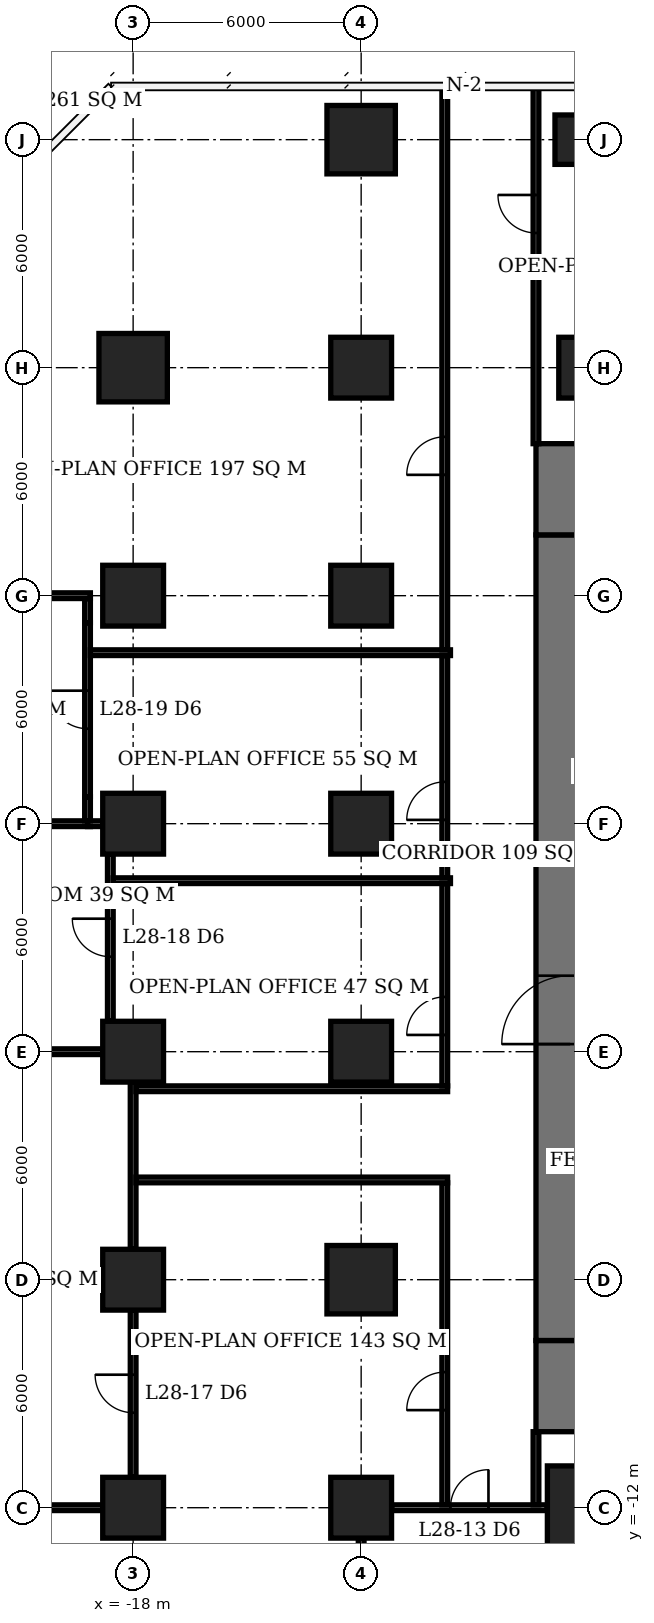
"""IFC4 building model, lengths in metres.
Left out: names, types, materials, properties, quantities, classifications, styles, units other than length and angle.
Written with IfcOpenShell. Run it as: python <this file> out.ifc"""

import sys

from ifc_helpers import new_model, si_unit, direction, frame, frame_2d, origin, origin_2d, place, context, subcontext, project, spatial, rectangle, extrude, element, fill, save


model = new_model("IFC4")
c1 = context("Model", 3, precision=1e-05, world=origin(), true_north=direction((0.0, 1.0)))
c2 = subcontext(c1, "Body", "Model", "MODEL_VIEW")
j1 = project(units=[si_unit("LENGTHUNIT", "METRE"), si_unit("PLANEANGLEUNIT", "RADIAN")], contexts=[c1])
p1 = place(None, origin())
s1 = spatial("IfcSite", under=j1, at=p1, CompositionType="ELEMENT")
p2 = place(p1, origin())
s2 = spatial("IfcBuilding", under=s1, at=p2, CompositionType="ELEMENT")
p3 = place(p2, frame((0.0, 0.0, 117.2)))
s3 = spatial("IfcBuildingStorey", under=s2, at=p3, CompositionType="ELEMENT", Elevation=117.2)
for number, where, z_axis, x_axis in (
    (1, (-18.0, -12.0, 0.0), (0.0, 0.0, 1.0), (1.0, 0.0, 0.0)),
    (2, (-18.0, -6.0, 0.0), (0.0, 0.0, 1.0), (1.0, 0.0, 0.0)),
    (3, (-18.0, 0.0, 0.0), (0.0, 0.0, 1.0), (1.0, 0.0, 0.0)),
    (4, (-18.0, 6.0, 0.0), (0.0, 0.0, 1.0), (1.0, 0.0, 0.0)),
    (5, (-18.0, 12.0, 0.0), (0.0, 0.0, 1.0), (1.0, 0.0, 0.0)),
):
    element("IfcColumn", number, at=place(p3, frame(where, z_axis=z_axis, x_axis=x_axis)), inside=s3, PredefinedType="COLUMN", context=c2, shape_type="SweptSolid", body=[
        extrude(rectangle(XDim=1.6, YDim=1.6, at=origin_2d()), origin(), (0.0, 0.0, 1.0), 3.9),
    ])
p4 = place(p3, frame((-18.0, 18.0, 0.0), z_axis=(0.0, 0.0, 1.0), x_axis=(1.0, 0.0, 0.0)))
e6 = element("IfcColumn", 6, at=p4, inside=s3, PredefinedType="COLUMN", context=c2, shape_type="SweptSolid", body=[
    extrude(rectangle(XDim=1.8, YDim=1.8, at=origin_2d()), origin(), (0.0, 0.0, 1.0), 3.9),
])
p5 = place(p3, frame((-12.0, -12.0, 0.0), z_axis=(0.0, 0.0, 1.0), x_axis=(1.0, 0.0, 0.0)))
e7 = element("IfcColumn", 7, at=p5, inside=s3, PredefinedType="COLUMN", context=c2, shape_type="SweptSolid", body=[
    extrude(rectangle(XDim=1.6, YDim=1.6, at=origin_2d()), origin(), (0.0, 0.0, 1.0), 3.9),
])
p6 = place(p3, frame((-12.0, -6.0, 0.0), z_axis=(0.0, 0.0, 1.0), x_axis=(1.0, 0.0, 0.0)))
e8 = element("IfcColumn", 8, at=p6, inside=s3, PredefinedType="COLUMN", context=c2, shape_type="SweptSolid", body=[
    extrude(rectangle(XDim=1.8, YDim=1.8, at=origin_2d()), origin(), (0.0, 0.0, 1.0), 3.9),
])
for number, where, z_axis, x_axis in (
    (9, (-12.0, 0.0, 0.0), (0.0, 0.0, 1.0), (1.0, 0.0, 0.0)),
    (10, (-12.0, 6.0, 0.0), (0.0, 0.0, 1.0), (1.0, 0.0, 0.0)),
    (11, (-12.0, 12.0, 0.0), (0.0, 0.0, 1.0), (1.0, 0.0, 0.0)),
    (12, (-12.0, 18.0, 0.0), (0.0, 0.0, 1.0), (1.0, 0.0, 0.0)),
):
    element("IfcColumn", number, at=place(p3, frame(where, z_axis=z_axis, x_axis=x_axis)), inside=s3, PredefinedType="COLUMN", context=c2, shape_type="SweptSolid", body=[
        extrude(rectangle(XDim=1.6, YDim=1.6, at=origin_2d()), origin(), (0.0, 0.0, 1.0), 3.9),
    ])
p7 = place(p3, frame((-12.0, 24.0, 0.0), z_axis=(0.0, 0.0, 1.0), x_axis=(1.0, 0.0, 0.0)))
e13 = element("IfcColumn", 13, at=p7, inside=s3, PredefinedType="COLUMN", context=c2, shape_type="SweptSolid", body=[
    extrude(rectangle(XDim=1.8, YDim=1.8, at=origin_2d()), origin(), (0.0, 0.0, 1.0), 3.9),
])
p8 = place(p3, frame((-6.0, -12.0, 0.0), z_axis=(0.0, 0.0, 1.0), x_axis=(1.0, 0.0, 0.0)))
e14 = element("IfcColumn", 14, at=p8, inside=s3, PredefinedType="COLUMN", context=c2, shape_type="SweptSolid", body=[
    extrude(rectangle(XDim=2.2, YDim=2.2, at=origin_2d()), origin(), (0.0, 0.0, 1.0), 3.9),
])
p9 = place(p3, frame((-6.0, 18.0, 0.0), z_axis=(0.0, 0.0, 1.0), x_axis=(1.0, 0.0, 0.0)))
e15 = element("IfcColumn", 15, at=p9, inside=s3, PredefinedType="COLUMN", context=c2, shape_type="SweptSolid", body=[
    extrude(rectangle(XDim=1.6, YDim=1.6, at=origin_2d()), origin(), (0.0, 0.0, 1.0), 3.9),
])
p10 = place(p3, frame((-6.0, 24.0, 0.0), z_axis=(0.0, 0.0, 1.0), x_axis=(1.0, 0.0, 0.0)))
e16 = element("IfcColumn", 16, at=p10, inside=s3, PredefinedType="COLUMN", context=c2, shape_type="SweptSolid", body=[
    extrude(rectangle(XDim=1.8, YDim=1.3, at=origin_2d()), origin(), (0.0, 0.0, 1.0), 3.9),
])
p11 = place(p3, frame((-6.5, -7.6, 0.0), z_axis=(0.0, 0.0, 1.0), x_axis=(0.0, 1.0, 0.0)))
e17 = element("IfcWall", 17, at=p11, inside=s3, PredefinedType="SHEAR", context=c2, shape_type="SweptSolid", body=[
    extrude(rectangle(XDim=21.2, YDim=1.8, at=frame_2d((10.6, 0.0))), origin(), (0.0, 0.0, 1.0), 3.9),
])
p12 = place(p11, frame((7.8, 0.0, 0.0)))
e18 = element("IfcOpeningElement", 18, at=p12, cuts=e17, PredefinedType="OPENING", context=c2, shape_type="SweptSolid", body=[
    extrude(rectangle(XDim=1.8, YDim=2.4, at=frame_2d((0.9, 1.2))), frame((0.0, 0.91, 0.0), z_axis=(0.0, -1.0, 0.0), x_axis=(1.0, 0.0, 0.0)), (0.0, 0.0, 1.0), 1.82),
])
for number, where, z_axis, x_axis in (
    (19, (-6.5, -10.0, 0.0), (0.0, 0.0, 1.0), (0.0, 1.0, 0.0)),
    (20, (-6.5, 13.6, 0.0), (0.0, 0.0, 1.0), (0.0, 1.0, 0.0)),
):
    element("IfcWall", number, at=place(p3, frame(where, z_axis=z_axis, x_axis=x_axis)), inside=s3, PredefinedType="SHEAR", context=c2, shape_type="SweptSolid", body=[
        extrude(rectangle(XDim=2.4, YDim=1.8, at=frame_2d((1.2, 0.0))), origin(), (0.0, 0.0, 1.0), 3.9),
    ])
p13 = place(p3, frame((-22.923, 24.37, 0.0), z_axis=(0.0, 0.0, 1.0), x_axis=(0.707106781187, 0.707106781187, 0.0)))
e21 = element("IfcWall", 21, at=p13, inside=s3, PredefinedType="USERDEFINED", context=c2, shape_type="SweptSolid", body=[
    extrude(rectangle(XDim=6.438, YDim=0.3, at=frame_2d((3.219, 0.0))), origin(), (0.0, 0.0, 1.0), 0.6),
])
p14 = place(p3, frame((-22.31, -12.0, 0.0), z_axis=(0.0, 0.0, 1.0), x_axis=(1.0, 0.0, 0.0)))
e22 = element("IfcWall", 22, at=p14, inside=s3, PredefinedType="PARTITIONING", context=c2, shape_type="SweptSolid", body=[
    extrude(rectangle(XDim=3.51, YDim=0.15, at=frame_2d((1.755, 0.0))), origin(), (0.0, 0.0, 1.0), 2.65),
])
p15 = place(p3, frame((-11.2, -12.0, 0.0), z_axis=(0.0, 0.0, 1.0), x_axis=(1.0, 0.0, 0.0)))
e23 = element("IfcWall", 23, at=p15, inside=s3, PredefinedType="PARTITIONING", context=c2, shape_type="SweptSolid", body=[
    extrude(rectangle(XDim=4.1, YDim=0.15, at=frame_2d((2.05, 0.0))), origin(), (0.0, 0.0, 1.0), 3.65),
])
p16 = place(p15, frame((1.55, 0.0, 0.0)))
e24 = element("IfcOpeningElement", 24, at=p16, cuts=e23, PredefinedType="OPENING", context=c2, shape_type="SweptSolid", body=[
    extrude(rectangle(XDim=1.0, YDim=2.1, at=frame_2d((0.5, 1.05))), frame((0.0, 0.085, 0.0), z_axis=(0.0, -1.0, 0.0), x_axis=(1.0, 0.0, 0.0)), (0.0, 0.0, 1.0), 0.17),
])
p17 = place(p3, frame((-22.31, 0.0, 0.0), z_axis=(0.0, 0.0, 1.0), x_axis=(1.0, 0.0, 0.0)))
e25 = element("IfcWall", 25, at=p17, inside=s3, PredefinedType="PARTITIONING", context=c2, shape_type="SweptSolid", body=[
    extrude(rectangle(XDim=3.51, YDim=0.15, at=frame_2d((1.755, 0.0))), origin(), (0.0, 0.0, 1.0), 2.65),
])
p18 = place(p3, frame((-22.31, 6.0, 0.0), z_axis=(0.0, 0.0, 1.0), x_axis=(1.0, 0.0, 0.0)))
e26 = element("IfcWall", 26, at=p18, inside=s3, PredefinedType="PARTITIONING", context=c2, shape_type="SweptSolid", body=[
    extrude(rectangle(XDim=3.185, YDim=0.15, at=frame_2d((1.593, 0.0))), origin(), (0.0, 0.0, 1.0), 2.65),
])
p19 = place(p3, frame((-19.2, 6.0, 0.0), z_axis=(0.0, 0.0, 1.0), x_axis=(1.0, 0.0, 0.0)))
e27 = element("IfcWall", 27, at=p19, inside=s3, PredefinedType="PARTITIONING", context=c2, shape_type="SweptSolid", body=[
    extrude(rectangle(XDim=0.4, YDim=0.15, at=frame_2d((0.2, 0.0))), origin(), (0.0, 0.0, 1.0), 2.65),
])
p20 = place(p3, frame((-22.31, 12.0, 0.0), z_axis=(0.0, 0.0, 1.0), x_axis=(1.0, 0.0, 0.0)))
e28 = element("IfcWall", 28, at=p20, inside=s3, PredefinedType="PARTITIONING", context=c2, shape_type="SweptSolid", body=[
    extrude(rectangle(XDim=3.185, YDim=0.15, at=frame_2d((1.593, 0.0))), origin(), (0.0, 0.0, 1.0), 2.65),
])
p21 = place(p3, frame((-19.2, 6.075, 0.0), z_axis=(0.0, 0.0, 1.0), x_axis=(0.0, 1.0, 0.0)))
e29 = element("IfcWall", 29, at=p21, inside=s3, PredefinedType="PARTITIONING", context=c2, shape_type="SweptSolid", body=[
    extrude(rectangle(XDim=0.635, YDim=0.15, at=frame_2d((0.317, 0.0))), origin(), (0.0, 0.0, 1.0), 2.65),
])
p22 = place(p3, frame((-19.2, 6.71, 0.0), z_axis=(0.0, 0.0, 1.0), x_axis=(0.0, 1.0, 0.0)))
e30 = element("IfcWall", 30, at=p22, inside=s3, PredefinedType="PARTITIONING", context=c2, shape_type="SweptSolid", body=[
    extrude(rectangle(XDim=4.58, YDim=0.15, at=frame_2d((2.29, 0.0))), origin(), (0.0, 0.0, 1.0), 3.65),
])
p23 = place(p22, frame((1.79, 0.0, 0.0)))
e31 = element("IfcOpeningElement", 31, at=p23, cuts=e30, PredefinedType="OPENING", context=c2, shape_type="SweptSolid", body=[
    extrude(rectangle(XDim=1.0, YDim=2.1, at=frame_2d((0.5, 1.05))), frame((0.0, 0.085, 0.0), z_axis=(0.0, -1.0, 0.0), x_axis=(1.0, 0.0, 0.0)), (0.0, 0.0, 1.0), 0.17),
])
p24 = place(p3, frame((-19.2, 11.29, 0.0), z_axis=(0.0, 0.0, 1.0), x_axis=(0.0, 1.0, 0.0)))
e32 = element("IfcWall", 32, at=p24, inside=s3, PredefinedType="PARTITIONING", context=c2, shape_type="SweptSolid", body=[
    extrude(rectangle(XDim=0.635, YDim=0.15, at=frame_2d((0.317, 0.0))), origin(), (0.0, 0.0, 1.0), 2.65),
])
p25 = place(p3, frame((-18.6, 0.8, 0.0), z_axis=(0.0, 0.0, 1.0), x_axis=(0.0, 1.0, 0.0)))
e33 = element("IfcWall", 33, at=p25, inside=s3, PredefinedType="PARTITIONING", context=c2, shape_type="SweptSolid", body=[
    extrude(rectangle(XDim=4.4, YDim=0.15, at=frame_2d((2.2, 0.0))), origin(), (0.0, 0.0, 1.0), 3.65),
])
p26 = place(p25, frame((1.7, 0.0, 0.0)))
e34 = element("IfcOpeningElement", 34, at=p26, cuts=e33, PredefinedType="OPENING", context=c2, shape_type="SweptSolid", body=[
    extrude(rectangle(XDim=1.0, YDim=2.1, at=frame_2d((0.5, 1.05))), frame((0.0, 0.085, 0.0), z_axis=(0.0, -1.0, 0.0), x_axis=(1.0, 0.0, 0.0)), (0.0, 0.0, 1.0), 0.17),
])
p27 = place(p3, frame((-18.0, -11.2, 0.0), z_axis=(0.0, 0.0, 1.0), x_axis=(0.0, 1.0, 0.0)))
e35 = element("IfcWall", 35, at=p27, inside=s3, PredefinedType="PARTITIONING", context=c2, shape_type="SweptSolid", body=[
    extrude(rectangle(XDim=4.4, YDim=0.15, at=frame_2d((2.2, 0.0))), origin(), (0.0, 0.0, 1.0), 3.65),
])
p28 = place(p27, frame((1.7, 0.0, 0.0)))
e36 = element("IfcOpeningElement", 36, at=p28, cuts=e35, PredefinedType="OPENING", context=c2, shape_type="SweptSolid", body=[
    extrude(rectangle(XDim=1.0, YDim=2.1, at=frame_2d((0.5, 1.05))), frame((0.0, 0.085, 0.0), z_axis=(0.0, -1.0, 0.0), x_axis=(1.0, 0.0, 0.0)), (0.0, 0.0, 1.0), 0.17),
])
p29 = place(p3, frame((-18.0, -5.2, 0.0), z_axis=(0.0, 0.0, 1.0), x_axis=(0.0, 1.0, 0.0)))
e37 = element("IfcWall", 37, at=p29, inside=s3, PredefinedType="PARTITIONING", context=c2, shape_type="SweptSolid", body=[
    extrude(rectangle(XDim=4.4, YDim=0.15, at=frame_2d((2.2, 0.0))), origin(), (0.0, 0.0, 1.0), 3.65),
])
p30 = place(p3, frame((-12.0, -16.31, 0.0), z_axis=(0.0, 0.0, 1.0), x_axis=(0.0, 1.0, 0.0)))
e38 = element("IfcWall", 38, at=p30, inside=s3, PredefinedType="PARTITIONING", context=c2, shape_type="SweptSolid", body=[
    extrude(rectangle(XDim=3.51, YDim=0.15, at=frame_2d((1.755, 0.0))), origin(), (0.0, 0.0, 1.0), 2.65),
])
p31 = place(p3, frame((-19.125, 10.5, 0.0), z_axis=(0.0, 0.0, 1.0), x_axis=(1.0, 0.0, 0.0)))
e39 = element("IfcWall", 39, at=p31, inside=s3, PredefinedType="PARTITIONING", context=c2, shape_type="SweptSolid", body=[
    extrude(rectangle(XDim=9.475, YDim=0.15, at=frame_2d((4.738, 0.0))), origin(), (0.0, 0.0, 1.0), 3.65),
])
p32 = place(p3, frame((-18.525, 4.5, 0.0), z_axis=(0.0, 0.0, 1.0), x_axis=(1.0, 0.0, 0.0)))
e40 = element("IfcWall", 40, at=p32, inside=s3, PredefinedType="PARTITIONING", context=c2, shape_type="SweptSolid", body=[
    extrude(rectangle(XDim=8.875, YDim=0.15, at=frame_2d((4.438, 0.0))), origin(), (0.0, 0.0, 1.0), 3.65),
])
for number, where, z_axis, x_axis in (
    (41, (-17.925, -3.375, 0.0), (0.0, 0.0, 1.0), (1.0, 0.0, 0.0)),
    (42, (-17.925, -0.975, 0.0), (0.0, 0.0, 1.0), (1.0, 0.0, 0.0)),
):
    element("IfcWall", number, at=place(p3, frame(where, z_axis=z_axis, x_axis=x_axis)), inside=s3, PredefinedType="PARTITIONING", context=c2, shape_type="SweptSolid", body=[
        extrude(rectangle(XDim=8.2, YDim=0.15, at=frame_2d((4.1, 0.0))), origin(), (0.0, 0.0, 1.0), 3.65),
    ])
p33 = place(p3, frame((-9.8, -11.925, 0.0), z_axis=(0.0, 0.0, 1.0), x_axis=(0.0, 1.0, 0.0)))
e43 = element("IfcWall", 43, at=p33, inside=s3, PredefinedType="PARTITIONING", context=c2, shape_type="SweptSolid", body=[
    extrude(rectangle(XDim=8.475, YDim=0.15, at=frame_2d((4.238, 0.0))), origin(), (0.0, 0.0, 1.0), 3.65),
])
p34 = place(p33, frame((2.493, 0.0, 0.0)))
e44 = element("IfcOpeningElement", 44, at=p34, cuts=e43, PredefinedType="OPENING", context=c2, shape_type="SweptSolid", body=[
    extrude(rectangle(XDim=1.0, YDim=2.1, at=frame_2d((0.5, 1.05))), frame((0.0, 0.085, 0.0), z_axis=(0.0, -1.0, 0.0), x_axis=(1.0, 0.0, 0.0)), (0.0, 0.0, 1.0), 0.17),
])
p35 = place(p3, frame((-9.8, -0.9, 0.0), z_axis=(0.0, 0.0, 1.0), x_axis=(0.0, 1.0, 0.0)))
e45 = element("IfcWall", 45, at=p35, inside=s3, PredefinedType="PARTITIONING", context=c2, shape_type="SweptSolid", body=[
    extrude(rectangle(XDim=5.325, YDim=0.15, at=frame_2d((2.663, 0.0))), origin(), (0.0, 0.0, 1.0), 3.65),
])
p36 = place(p35, frame((1.341, 0.0, 0.0)))
e46 = element("IfcOpeningElement", 46, at=p36, cuts=e45, PredefinedType="OPENING", context=c2, shape_type="SweptSolid", body=[
    extrude(rectangle(XDim=1.0, YDim=2.1, at=frame_2d((0.5, 1.05))), frame((0.0, 0.085, 0.0), z_axis=(0.0, -1.0, 0.0), x_axis=(1.0, 0.0, 0.0)), (0.0, 0.0, 1.0), 0.17),
])
p37 = place(p3, frame((-9.8, 4.575, 0.0), z_axis=(0.0, 0.0, 1.0), x_axis=(0.0, 1.0, 0.0)))
e47 = element("IfcWall", 47, at=p37, inside=s3, PredefinedType="PARTITIONING", context=c2, shape_type="SweptSolid", body=[
    extrude(rectangle(XDim=5.85, YDim=0.15, at=frame_2d((2.925, 0.0))), origin(), (0.0, 0.0, 1.0), 3.65),
])
p38 = place(p37, frame((1.525, 0.0, 0.0)))
e48 = element("IfcOpeningElement", 48, at=p38, cuts=e47, PredefinedType="OPENING", context=c2, shape_type="SweptSolid", body=[
    extrude(rectangle(XDim=1.0, YDim=2.1, at=frame_2d((0.5, 1.05))), frame((0.0, 0.085, 0.0), z_axis=(0.0, -1.0, 0.0), x_axis=(1.0, 0.0, 0.0)), (0.0, 0.0, 1.0), 0.17),
])
p39 = place(p3, frame((-9.8, 10.575, 0.0), z_axis=(0.0, 0.0, 1.0), x_axis=(0.0, 1.0, 0.0)))
e49 = element("IfcWall", 49, at=p39, inside=s3, PredefinedType="PARTITIONING", context=c2, shape_type="SweptSolid", body=[
    extrude(rectangle(XDim=14.825, YDim=0.15, at=frame_2d((7.413, 0.0))), origin(), (0.0, 0.0, 1.0), 3.65),
])
p40 = place(p39, frame((4.605, 0.0, 0.0)))
e50 = element("IfcOpeningElement", 50, at=p40, cuts=e49, PredefinedType="OPENING", context=c2, shape_type="SweptSolid", body=[
    extrude(rectangle(XDim=1.0, YDim=2.1, at=frame_2d((0.5, 1.05))), frame((0.0, 0.085, 0.0), z_axis=(0.0, -1.0, 0.0), x_axis=(1.0, 0.0, 0.0)), (0.0, 0.0, 1.0), 0.17),
])
p41 = place(p3, frame((-7.4, -11.925, 0.0), z_axis=(0.0, 0.0, 1.0), x_axis=(0.0, 1.0, 0.0)))
e51 = element("IfcWall", 51, at=p41, inside=s3, PredefinedType="PARTITIONING", context=c2, shape_type="SweptSolid", body=[
    extrude(rectangle(XDim=1.925, YDim=0.15, at=frame_2d((0.962, 0.0))), origin(), (0.0, 0.0, 1.0), 3.65),
])
p42 = place(p3, frame((-7.4, 16.0, 0.0), z_axis=(0.0, 0.0, 1.0), x_axis=(0.0, 1.0, 0.0)))
e52 = element("IfcWall", 52, at=p42, inside=s3, PredefinedType="PARTITIONING", context=c2, shape_type="SweptSolid", body=[
    extrude(rectangle(XDim=9.4, YDim=0.15, at=frame_2d((4.7, 0.0))), origin(), (0.0, 0.0, 1.0), 3.65),
])
p43 = place(p42, frame((5.545, 0.0, 0.0)))
e53 = element("IfcOpeningElement", 53, at=p43, cuts=e52, PredefinedType="OPENING", context=c2, shape_type="SweptSolid", body=[
    extrude(rectangle(XDim=1.0, YDim=2.1, at=frame_2d((0.5, 1.05))), frame((0.0, 0.085, 0.0), z_axis=(0.0, -1.0, 0.0), x_axis=(1.0, 0.0, 0.0)), (0.0, 0.0, 1.0), 0.17),
])
p44 = place(p12, origin())
e54 = element("IfcDoor", 54, at=p44, inside=s3, OperationType="DOUBLE_DOOR_SINGLE_SWING", PredefinedType="DOOR", context=c2, shape_type="SweptSolid", body=[
    extrude(rectangle(XDim=1.8, YDim=2.4, at=frame_2d((0.9, 1.2))), frame((0.0, 0.025, 0.0), z_axis=(0.0, -1.0, 0.0), x_axis=(1.0, 0.0, 0.0)), (0.0, 0.0, 1.0), 0.05),
])
fill(e18, e54)
p45 = place(p16, origin())
e55 = element("IfcDoor", 55, at=p45, inside=s3, OperationType="SINGLE_SWING_RIGHT", PredefinedType="DOOR", context=c2, shape_type="SweptSolid", body=[
    extrude(rectangle(XDim=1.0, YDim=2.1, at=frame_2d((0.5, 1.05))), frame((0.0, 0.025, 0.0), z_axis=(0.0, -1.0, 0.0), x_axis=(1.0, 0.0, 0.0)), (0.0, 0.0, 1.0), 0.05),
])
fill(e24, e55)
p46 = place(p28, origin())
e56 = element("IfcDoor", 56, at=p46, inside=s3, OperationType="SINGLE_SWING_RIGHT", PredefinedType="DOOR", context=c2, shape_type="SweptSolid", body=[
    extrude(rectangle(XDim=1.0, YDim=2.1, at=frame_2d((0.5, 1.05))), frame((0.0, 0.025, 0.0), z_axis=(0.0, -1.0, 0.0), x_axis=(1.0, 0.0, 0.0)), (0.0, 0.0, 1.0), 0.05),
])
fill(e36, e56)
p47 = place(p26, origin())
e57 = element("IfcDoor", 57, at=p47, inside=s3, OperationType="SINGLE_SWING_RIGHT", PredefinedType="DOOR", context=c2, shape_type="SweptSolid", body=[
    extrude(rectangle(XDim=1.0, YDim=2.1, at=frame_2d((0.5, 1.05))), frame((0.0, 0.025, 0.0), z_axis=(0.0, -1.0, 0.0), x_axis=(1.0, 0.0, 0.0)), (0.0, 0.0, 1.0), 0.05),
])
fill(e34, e57)
p48 = place(p23, origin())
e58 = element("IfcDoor", 58, at=p48, inside=s3, OperationType="SINGLE_SWING_RIGHT", PredefinedType="DOOR", context=c2, shape_type="SweptSolid", body=[
    extrude(rectangle(XDim=1.0, YDim=2.1, at=frame_2d((0.5, 1.05))), frame((0.0, 0.025, 0.0), z_axis=(0.0, -1.0, 0.0), x_axis=(1.0, 0.0, 0.0)), (0.0, 0.0, 1.0), 0.05),
])
fill(e31, e58)
p49 = place(p34, origin())
e59 = element("IfcDoor", 59, at=p49, inside=s3, OperationType="SINGLE_SWING_LEFT", PredefinedType="DOOR", context=c2, shape_type="SweptSolid", body=[
    extrude(rectangle(XDim=1.0, YDim=2.1, at=frame_2d((0.5, 1.05))), frame((0.0, 0.025, 0.0), z_axis=(0.0, -1.0, 0.0), x_axis=(1.0, 0.0, 0.0)), (0.0, 0.0, 1.0), 0.05),
])
fill(e44, e59)
p50 = place(p38, origin())
e60 = element("IfcDoor", 60, at=p50, inside=s3, OperationType="SINGLE_SWING_LEFT", PredefinedType="DOOR", context=c2, shape_type="SweptSolid", body=[
    extrude(rectangle(XDim=1.0, YDim=2.1, at=frame_2d((0.5, 1.05))), frame((0.0, 0.025, 0.0), z_axis=(0.0, -1.0, 0.0), x_axis=(1.0, 0.0, 0.0)), (0.0, 0.0, 1.0), 0.05),
])
fill(e48, e60)
p51 = place(p40, origin())
e61 = element("IfcDoor", 61, at=p51, inside=s3, OperationType="SINGLE_SWING_LEFT", PredefinedType="DOOR", context=c2, shape_type="SweptSolid", body=[
    extrude(rectangle(XDim=1.0, YDim=2.1, at=frame_2d((0.5, 1.05))), frame((0.0, 0.025, 0.0), z_axis=(0.0, -1.0, 0.0), x_axis=(1.0, 0.0, 0.0)), (0.0, 0.0, 1.0), 0.05),
])
fill(e50, e61)
p52 = place(p43, origin())
e62 = element("IfcDoor", 62, at=p52, inside=s3, OperationType="SINGLE_SWING_RIGHT", PredefinedType="DOOR", context=c2, shape_type="SweptSolid", body=[
    extrude(rectangle(XDim=1.0, YDim=2.1, at=frame_2d((0.5, 1.05))), frame((0.0, 0.025, 0.0), z_axis=(0.0, -1.0, 0.0), x_axis=(1.0, 0.0, 0.0)), (0.0, 0.0, 1.0), 0.05),
])
fill(e53, e62)
p53 = place(p36, origin())
e63 = element("IfcDoor", 63, at=p53, inside=s3, OperationType="SINGLE_SWING_LEFT", PredefinedType="DOOR", context=c2, shape_type="SweptSolid", body=[
    extrude(rectangle(XDim=1.0, YDim=2.1, at=frame_2d((0.5, 1.05))), frame((0.0, 0.025, 0.0), z_axis=(0.0, -1.0, 0.0), x_axis=(1.0, 0.0, 0.0)), (0.0, 0.0, 1.0), 0.05),
])
fill(e46, e63)
save(model, sys.argv[1])
